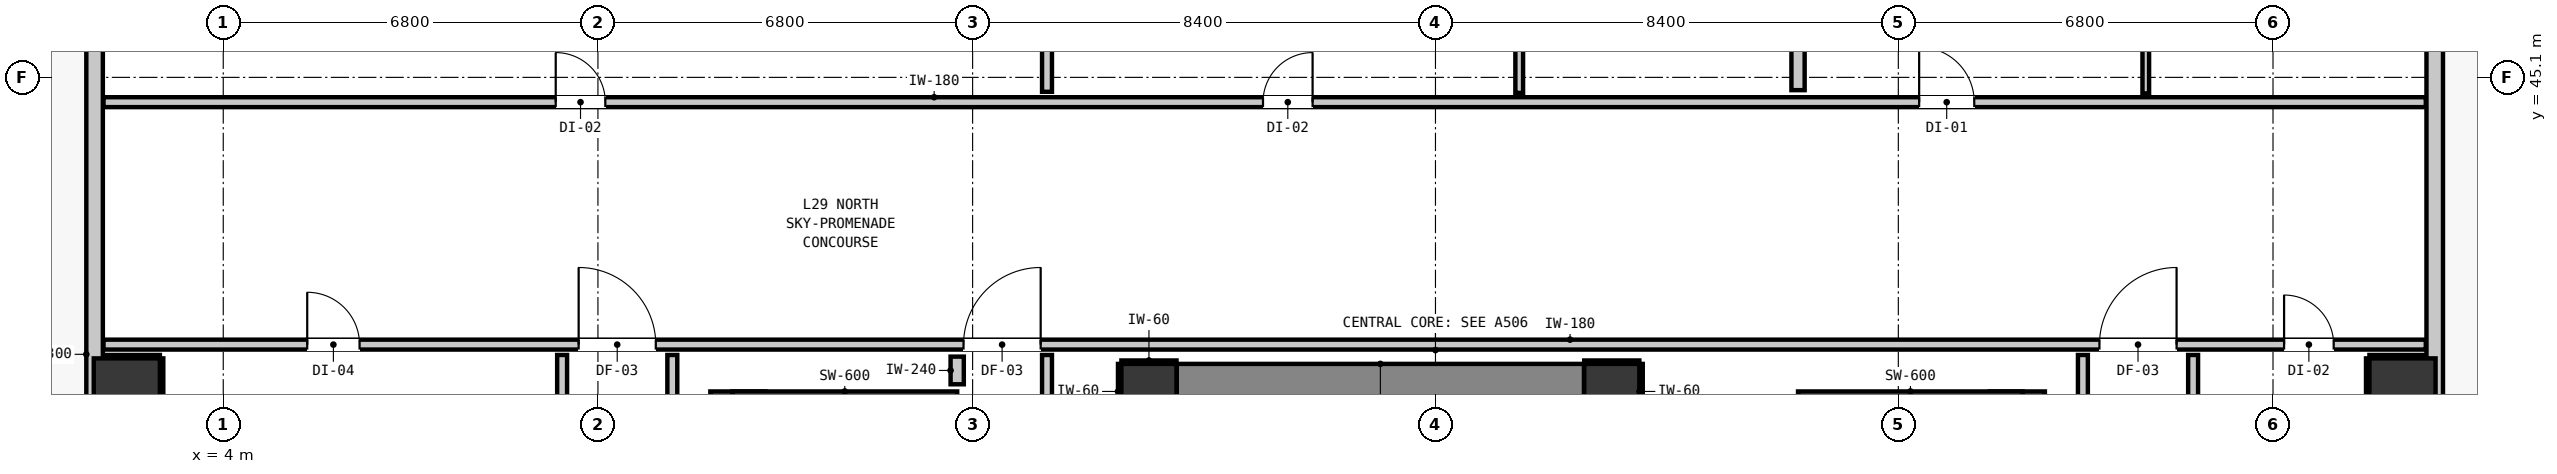
"""IFC4 building model, lengths in metres.
Left out: names, types, materials, properties, quantities, classifications, styles, units other than length and angle.
Written with IfcOpenShell. Run it as: python <this file> out.ifc"""

import sys

from ifc_helpers import new_model, si_unit, direction, frame, frame_2d, origin, origin_2d, place, context, subcontext, project, spatial, rectangle, extrude, element, fill, save


model = new_model("IFC4")
c1 = context("Model", 3, precision=1e-05, world=origin(), true_north=direction((0.0, 1.0)))
c2 = subcontext(c1, "Body", "Model", "MODEL_VIEW")
j1 = project(units=[si_unit("LENGTHUNIT", "METRE"), si_unit("PLANEANGLEUNIT", "RADIAN")], contexts=[c1])
p1 = place(None, origin())
s1 = spatial("IfcSite", under=j1, at=p1, CompositionType="ELEMENT")
p2 = place(p1, origin())
s2 = spatial("IfcBuilding", under=s1, at=p2, CompositionType="ELEMENT")
p3 = place(p2, frame((0.0, 0.0, 102.76)))
s3 = spatial("IfcBuildingStorey", under=s2, at=p3, CompositionType="ELEMENT", Elevation=102.76)
for number, where, z_axis, x_axis in (
    (1, (20.8, 39.4, 0.0), (0.0, 0.0, 1.0), (1.0, 0.0, 0.0)),
    (2, (29.2, 39.4, 0.0), (0.0, 0.0, 1.0), (1.0, 0.0, 0.0)),
):
    element("IfcColumn", number, at=place(p3, frame(where, z_axis=z_axis, x_axis=x_axis)), inside=s3, PredefinedType="COLUMN", context=c2, shape_type="SweptSolid", body=[
        extrude(rectangle(XDim=1.0, YDim=1.0, at=origin_2d()), origin(), (0.0, 0.0, 1.0), 3.32),
    ])
p4 = place(p3, frame((13.34, 31.205, 0.0), z_axis=(0.0, 0.0, 1.0), x_axis=(0.0, 1.0, 0.0)))
e3 = element("IfcWall", 3, at=p4, inside=s3, PredefinedType="SHEAR", context=c2, shape_type="SweptSolid", body=[
    extrude(rectangle(XDim=8.195, YDim=1.0, at=frame_2d((4.097, 0.0))), origin(), (0.0, 0.0, 1.0), 3.32),
])
p5 = place(p3, frame((13.24, 39.1, 0.0), z_axis=(0.0, 0.0, 1.0), x_axis=(1.0, 0.0, 0.0)))
e4 = element("IfcWall", 4, at=p5, inside=s3, PredefinedType="SHEAR", context=c2, shape_type="SweptSolid", body=[
    extrude(rectangle(XDim=4.08, YDim=0.6, at=frame_2d((2.04, 0.0))), origin(), (0.0, 0.0, 1.0), 3.32),
])
p6 = place(p3, frame((36.56, 31.205, 0.0), z_axis=(0.0, 0.0, 1.0), x_axis=(0.0, 1.0, 0.0)))
e5 = element("IfcWall", 5, at=p6, inside=s3, PredefinedType="SHEAR", context=c2, shape_type="SweptSolid", body=[
    extrude(rectangle(XDim=8.195, YDim=1.0, at=frame_2d((4.097, 0.0))), origin(), (0.0, 0.0, 1.0), 3.32),
])
p7 = place(p3, frame((32.58, 39.1, 0.0), z_axis=(0.0, 0.0, 1.0), x_axis=(1.0, 0.0, 0.0)))
e6 = element("IfcWall", 6, at=p7, inside=s3, PredefinedType="SHEAR", context=c2, shape_type="SweptSolid", body=[
    extrude(rectangle(XDim=4.08, YDim=0.6, at=frame_2d((2.04, 0.0))), origin(), (0.0, 0.0, 1.0), 3.32),
])
p8 = place(p3, frame((21.305, 39.4, 0.0), z_axis=(0.0, 0.0, 1.0), x_axis=(1.0, 0.0, 0.0)))
e7 = element("IfcWall", 7, at=p8, inside=s3, PredefinedType="SHEAR", context=c2, shape_type="SweptSolid", body=[
    extrude(rectangle(XDim=7.39, YDim=1.0, at=frame_2d((3.695, 0.0))), origin(), (0.0, 0.0, 1.0), 3.32),
])
for number, where, z_axis, x_axis in (
    (8, (2.25, 39.4, 0.0), (0.0, 0.0, 1.0), (1.0, 0.0, 0.0)),
    (9, (43.55, 39.4, 0.0), (0.0, 0.0, 1.0), (1.0, 0.0, 0.0)),
):
    element("IfcColumn", number, at=place(p3, frame(where, z_axis=z_axis, x_axis=x_axis)), inside=s3, PredefinedType="COLUMN", context=c2, shape_type="SweptSolid", body=[
        extrude(rectangle(XDim=1.2, YDim=1.2, at=origin_2d()), origin(), (0.0, 0.0, 1.0), 2.9),
    ])
p9 = place(p3, frame((1.665, 16.365, 0.0), z_axis=(0.0, 0.0, 1.0), x_axis=(0.0, 1.0, 0.0)))
e10 = element("IfcWall", 10, at=p9, inside=s3, PredefinedType="STANDARD", context=c2, shape_type="SweptSolid", body=[
    extrude(rectangle(XDim=34.67, YDim=0.3, at=frame_2d((17.335, 0.0))), origin(), (0.0, 0.0, 1.0), 2.9),
])
p10 = place(p9, frame((8.955, 0.0, 0.0)))
e11 = element("IfcOpeningElement", 11, at=p10, cuts=e10, PredefinedType="OPENING", context=c2, shape_type="SweptSolid", body=[
    extrude(rectangle(XDim=1.0, YDim=2.15, at=frame_2d((0.5, 1.075))), frame((0.0, 0.16, 0.0), z_axis=(0.0, -1.0, 0.0), x_axis=(1.0, 0.0, 0.0)), (0.0, 0.0, 1.0), 0.32),
])
p11 = place(p9, frame((30.958, 0.0, 0.85)))
e12 = element("IfcOpeningElement", 12, at=p11, cuts=e10, PredefinedType="OPENING", context=c2, shape_type="SweptSolid", body=[
    extrude(rectangle(XDim=1.05, YDim=1.65, at=frame_2d((0.525, 0.825))), frame((0.0, 0.16, 0.0), z_axis=(0.0, -1.0, 0.0), x_axis=(1.0, 0.0, 0.0)), (0.0, 0.0, 1.0), 0.32),
])
p12 = place(p9, frame((10.88, 0.0, 0.85)))
e13 = element("IfcOpeningElement", 13, at=p12, cuts=e10, PredefinedType="OPENING", context=c2, shape_type="SweptSolid", body=[
    extrude(rectangle(XDim=1.05, YDim=1.65, at=frame_2d((0.525, 0.825))), frame((0.0, 0.16, 0.0), z_axis=(0.0, -1.0, 0.0), x_axis=(1.0, 0.0, 0.0)), (0.0, 0.0, 1.0), 0.32),
])
p13 = place(p9, frame((15.41, 0.0, 0.85)))
e14 = element("IfcOpeningElement", 14, at=p13, cuts=e10, PredefinedType="OPENING", context=c2, shape_type="SweptSolid", body=[
    extrude(rectangle(XDim=1.05, YDim=1.65, at=frame_2d((0.525, 0.825))), frame((0.0, 0.16, 0.0), z_axis=(0.0, -1.0, 0.0), x_axis=(1.0, 0.0, 0.0)), (0.0, 0.0, 1.0), 0.32),
])
p14 = place(p3, frame((44.135, 51.035, 0.0), z_axis=(0.0, 0.0, 1.0), x_axis=(0.0, -1.0, 0.0)))
e15 = element("IfcWall", 15, at=p14, inside=s3, PredefinedType="STANDARD", context=c2, shape_type="SweptSolid", body=[
    extrude(rectangle(XDim=34.67, YDim=0.3, at=frame_2d((17.335, 0.0))), origin(), (0.0, 0.0, 1.0), 2.9),
])
p15 = place(p14, frame((0.901, 0.0, 0.0)))
e16 = element("IfcOpeningElement", 16, at=p15, cuts=e15, PredefinedType="OPENING", context=c2, shape_type="SweptSolid", body=[
    extrude(rectangle(XDim=1.0, YDim=2.15, at=frame_2d((0.5, 1.075))), frame((0.0, 0.16, 0.0), z_axis=(0.0, -1.0, 0.0), x_axis=(1.0, 0.0, 0.0)), (0.0, 0.0, 1.0), 0.32),
])
p16 = place(p14, frame((32.608, 0.0, 0.85)))
e17 = element("IfcOpeningElement", 17, at=p16, cuts=e15, PredefinedType="OPENING", context=c2, shape_type="SweptSolid", body=[
    extrude(rectangle(XDim=1.05, YDim=1.65, at=frame_2d((0.525, 0.825))), frame((0.0, 0.16, 0.0), z_axis=(0.0, -1.0, 0.0), x_axis=(1.0, 0.0, 0.0)), (0.0, 0.0, 1.0), 0.32),
])
p17 = place(p14, frame((23.248, 0.0, 0.85)))
e18 = element("IfcOpeningElement", 18, at=p17, cuts=e15, PredefinedType="OPENING", context=c2, shape_type="SweptSolid", body=[
    extrude(rectangle(XDim=1.05, YDim=1.65, at=frame_2d((0.525, 0.825))), frame((0.0, 0.16, 0.0), z_axis=(0.0, -1.0, 0.0), x_axis=(1.0, 0.0, 0.0)), (0.0, 0.0, 1.0), 0.32),
])
p18 = place(p3, frame((1.827, 40.25, 0.0), z_axis=(0.0, 0.0, 1.0), x_axis=(1.0, 0.0, 0.0)))
e19 = element("IfcWall", 19, at=p18, inside=s3, PredefinedType="PARTITIONING", context=c2, shape_type="SweptSolid", body=[
    extrude(rectangle(XDim=42.146, YDim=0.18, at=frame_2d((21.073, 0.0))), origin(), (0.0, 0.0, 1.0), 2.9),
])
p19 = place(p18, frame((15.608, 0.0, 0.0)))
e20 = element("IfcOpeningElement", 20, at=p19, cuts=e19, PredefinedType="OPENING", context=c2, shape_type="SweptSolid", body=[
    extrude(rectangle(XDim=1.4, YDim=2.15, at=frame_2d((0.7, 1.075))), frame((0.0, 0.1, 0.0), z_axis=(0.0, -1.0, 0.0), x_axis=(1.0, 0.0, 0.0)), (0.0, 0.0, 1.0), 0.2),
])
p20 = place(p18, frame((8.623, 0.0, 0.0)))
e21 = element("IfcOpeningElement", 21, at=p20, cuts=e19, PredefinedType="OPENING", context=c2, shape_type="SweptSolid", body=[
    extrude(rectangle(XDim=1.4, YDim=2.15, at=frame_2d((0.7, 1.075))), frame((0.0, 0.1, 0.0), z_axis=(0.0, -1.0, 0.0), x_axis=(1.0, 0.0, 0.0)), (0.0, 0.0, 1.0), 0.2),
])
p21 = place(p18, frame((36.223, 0.0, 0.0)))
e22 = element("IfcOpeningElement", 22, at=p21, cuts=e19, PredefinedType="OPENING", context=c2, shape_type="SweptSolid", body=[
    extrude(rectangle(XDim=1.4, YDim=2.15, at=frame_2d((0.7, 1.075))), frame((0.0, 0.1, 0.0), z_axis=(0.0, -1.0, 0.0), x_axis=(1.0, 0.0, 0.0)), (0.0, 0.0, 1.0), 0.2),
])
p22 = place(p18, frame((3.697, 0.0, 0.0)))
e23 = element("IfcOpeningElement", 23, at=p22, cuts=e19, PredefinedType="OPENING", context=c2, shape_type="SweptSolid", body=[
    extrude(rectangle(XDim=0.95, YDim=2.1, at=frame_2d((0.475, 1.05))), frame((0.0, 0.1, 0.0), z_axis=(0.0, -1.0, 0.0), x_axis=(1.0, 0.0, 0.0)), (0.0, 0.0, 1.0), 0.2),
])
p23 = place(p18, frame((39.574, 0.0, 0.0)))
e24 = element("IfcOpeningElement", 24, at=p23, cuts=e19, PredefinedType="OPENING", context=c2, shape_type="SweptSolid", body=[
    extrude(rectangle(XDim=0.9, YDim=2.1, at=frame_2d((0.45, 1.05))), frame((0.0, 0.1, 0.0), z_axis=(0.0, -1.0, 0.0), x_axis=(1.0, 0.0, 0.0)), (0.0, 0.0, 1.0), 0.2),
])
p24 = place(p3, frame((1.827, 44.65, 0.0), z_axis=(0.0, 0.0, 1.0), x_axis=(1.0, 0.0, 0.0)))
e25 = element("IfcWall", 25, at=p24, inside=s3, PredefinedType="PARTITIONING", context=c2, shape_type="SweptSolid", body=[
    extrude(rectangle(XDim=42.146, YDim=0.18, at=frame_2d((21.073, 0.0))), origin(), (0.0, 0.0, 1.0), 2.9),
])
p25 = place(p24, frame((8.207, 0.0, 0.0)))
e26 = element("IfcOpeningElement", 26, at=p25, cuts=e25, PredefinedType="OPENING", context=c2, shape_type="SweptSolid", body=[
    extrude(rectangle(XDim=0.9, YDim=2.1, at=frame_2d((0.45, 1.05))), frame((0.0, 0.1, 0.0), z_axis=(0.0, -1.0, 0.0), x_axis=(1.0, 0.0, 0.0)), (0.0, 0.0, 1.0), 0.2),
])
p26 = place(p24, frame((21.043, 0.0, 0.0)))
e27 = element("IfcOpeningElement", 27, at=p26, cuts=e25, PredefinedType="OPENING", context=c2, shape_type="SweptSolid", body=[
    extrude(rectangle(XDim=0.9, YDim=2.1, at=frame_2d((0.45, 1.05))), frame((0.0, 0.1, 0.0), z_axis=(0.0, -1.0, 0.0), x_axis=(1.0, 0.0, 0.0)), (0.0, 0.0, 1.0), 0.2),
])
p27 = place(p24, frame((32.951, 0.0, 0.0)))
e28 = element("IfcOpeningElement", 28, at=p27, cuts=e25, PredefinedType="OPENING", context=c2, shape_type="SweptSolid", body=[
    extrude(rectangle(XDim=1.0, YDim=2.15, at=frame_2d((0.5, 1.075))), frame((0.0, 0.1, 0.0), z_axis=(0.0, -1.0, 0.0), x_axis=(1.0, 0.0, 0.0)), (0.0, 0.0, 1.0), 0.2),
])
p28 = place(p3, frame((17.32, 39.53, 0.0), z_axis=(0.0, 0.0, 1.0), x_axis=(0.0, 1.0, 0.0)))
e29 = element("IfcWall", 29, at=p28, inside=s3, PredefinedType="PARTITIONING", context=c2, shape_type="SweptSolid", body=[
    extrude(rectangle(XDim=0.502, YDim=0.24, at=frame_2d((0.251, 0.0))), origin(), (0.0, 0.0, 1.0), 2.9),
])
p29 = place(p3, frame((32.58, 44.868, 0.0), z_axis=(0.0, 0.0, 1.0), x_axis=(0.0, 1.0, 0.0)))
e30 = element("IfcWall", 30, at=p29, inside=s3, PredefinedType="PARTITIONING", context=c2, shape_type="SweptSolid", body=[
    extrude(rectangle(XDim=3.421, YDim=0.24, at=frame_2d((1.71, 0.0))), origin(), (0.0, 0.0, 1.0), 2.9),
])
p30 = place(p29, frame((1.246, 0.0, 0.0)))
e31 = element("IfcOpeningElement", 31, at=p30, cuts=e30, PredefinedType="OPENING", context=c2, shape_type="SweptSolid", body=[
    extrude(rectangle(XDim=0.86, YDim=2.02, at=frame_2d((0.43, 1.01))), frame((0.0, 0.13, 0.0), z_axis=(0.0, -1.0, 0.0), x_axis=(1.0, 0.0, 0.0)), (0.0, 0.0, 1.0), 0.26),
])
p31 = place(p3, frame((10.15, 36.818, 0.0), z_axis=(0.0, 0.0, 1.0), x_axis=(0.0, 1.0, 0.0)))
e32 = element("IfcWall", 32, at=p31, inside=s3, PredefinedType="PARTITIONING", context=c2, shape_type="SweptSolid", body=[
    extrude(rectangle(XDim=3.244, YDim=0.18, at=frame_2d((1.622, 0.0))), origin(), (0.0, 0.0, 1.0), 2.9),
])
p32 = place(p3, frame((12.15, 21.368, 0.0), z_axis=(0.0, 0.0, 1.0), x_axis=(0.0, 1.0, 0.0)))
e33 = element("IfcWall", 33, at=p32, inside=s3, PredefinedType="PARTITIONING", context=c2, shape_type="SweptSolid", body=[
    extrude(rectangle(XDim=18.694, YDim=0.18, at=frame_2d((9.347, 0.0))), origin(), (0.0, 0.0, 1.0), 2.9),
])
p33 = place(p3, frame((18.95, 39.058, 0.0), z_axis=(0.0, 0.0, 1.0), x_axis=(0.0, 1.0, 0.0)))
e34 = element("IfcWall", 34, at=p33, inside=s3, PredefinedType="PARTITIONING", context=c2, shape_type="SweptSolid", body=[
    extrude(rectangle(XDim=1.004, YDim=0.18, at=frame_2d((0.502, 0.0))), origin(), (0.0, 0.0, 1.0), 2.9),
])
p34 = place(p3, frame((18.95, 44.838, 0.0), z_axis=(0.0, 0.0, 1.0), x_axis=(0.0, 1.0, 0.0)))
e35 = element("IfcWall", 35, at=p34, inside=s3, PredefinedType="PARTITIONING", context=c2, shape_type="SweptSolid", body=[
    extrude(rectangle(XDim=8.535, YDim=0.18, at=frame_2d((4.268, 0.0))), origin(), (0.0, 0.0, 1.0), 2.9),
])
p35 = place(p3, frame((37.75, 21.368, 0.0), z_axis=(0.0, 0.0, 1.0), x_axis=(0.0, 1.0, 0.0)))
e36 = element("IfcWall", 36, at=p35, inside=s3, PredefinedType="PARTITIONING", context=c2, shape_type="SweptSolid", body=[
    extrude(rectangle(XDim=18.694, YDim=0.18, at=frame_2d((9.347, 0.0))), origin(), (0.0, 0.0, 1.0), 2.9),
])
p36 = place(p3, frame((39.75, 34.158, 0.0), z_axis=(0.0, 0.0, 1.0), x_axis=(0.0, 1.0, 0.0)))
e37 = element("IfcWall", 37, at=p36, inside=s3, PredefinedType="PARTITIONING", context=c2, shape_type="SweptSolid", body=[
    extrude(rectangle(XDim=5.904, YDim=0.18, at=frame_2d((2.952, 0.0))), origin(), (0.0, 0.0, 1.0), 2.9),
])
p37 = place(p3, frame((27.52, 44.818, 0.0), z_axis=(0.0, 0.0, 1.0), x_axis=(0.0, 1.0, 0.0)))
e38 = element("IfcWall", 38, at=p37, inside=s3, PredefinedType="PARTITIONING", context=c2, shape_type="SweptSolid", body=[
    extrude(rectangle(XDim=3.447, YDim=0.14, at=frame_2d((1.723, 0.0))), origin(), (0.0, 0.0, 1.0), 2.9),
])
p38 = place(p3, frame((38.891, 44.808, 0.0), z_axis=(0.0, 0.0, 1.0), x_axis=(0.0, 1.0, 0.0)))
e39 = element("IfcWall", 39, at=p38, inside=s3, PredefinedType="PARTITIONING", context=c2, shape_type="SweptSolid", body=[
    extrude(rectangle(XDim=3.467, YDim=0.12, at=frame_2d((1.733, 0.0))), origin(), (0.0, 0.0, 1.0), 2.9),
])
p39 = place(p38, frame((1.286, 0.0, 0.0)))
e40 = element("IfcOpeningElement", 40, at=p39, cuts=e39, PredefinedType="OPENING", context=c2, shape_type="SweptSolid", body=[
    extrude(rectangle(XDim=0.9, YDim=2.1, at=frame_2d((0.45, 1.05))), frame((0.0, 0.07, 0.0), z_axis=(0.0, -1.0, 0.0), x_axis=(1.0, 0.0, 0.0)), (0.0, 0.0, 1.0), 0.14),
])
for number, where, z_axis, x_axis in (
    (41, (20.3, 39.932, 0.0), (0.0, 0.0, 1.0), (1.0, 0.0, 0.0)),
    (42, (20.268, 38.9, 0.0), (0.0, 0.0, 1.0), (0.0, 1.0, 0.0)),
    (43, (28.7, 39.932, 0.0), (0.0, 0.0, 1.0), (1.0, 0.0, 0.0)),
    (44, (29.732, 38.9, 0.0), (0.0, 0.0, 1.0), (0.0, 1.0, 0.0)),
):
    element("IfcWall", number, at=place(p3, frame(where, z_axis=z_axis, x_axis=x_axis)), inside=s3, PredefinedType="PARTITIONING", context=c2, shape_type="SweptSolid", body=[
        extrude(rectangle(XDim=1.0, YDim=0.06, at=frame_2d((0.5, 0.0))), origin(), (0.0, 0.0, 1.0), 0.905),
    ])
p40 = place(p3, frame((1.83, 40.032, 0.0), z_axis=(0.0, 0.0, 1.0), x_axis=(1.0, 0.0, 0.0)))
e45 = element("IfcWall", 45, at=p40, inside=s3, PredefinedType="PARTITIONING", context=c2, shape_type="SweptSolid", body=[
    extrude(rectangle(XDim=1.02, YDim=0.06, at=frame_2d((0.51, 0.0))), origin(), (0.0, 0.0, 1.0), 0.905),
])
p41 = place(p3, frame((2.882, 38.8, 0.0), z_axis=(0.0, 0.0, 1.0), x_axis=(0.0, 1.0, 0.0)))
e46 = element("IfcWall", 46, at=p41, inside=s3, PredefinedType="PARTITIONING", context=c2, shape_type="SweptSolid", body=[
    extrude(rectangle(XDim=1.2, YDim=0.06, at=frame_2d((0.6, 0.0))), origin(), (0.0, 0.0, 1.0), 1.45),
])
p42 = place(p3, frame((42.95, 40.032, 0.0), z_axis=(0.0, 0.0, 1.0), x_axis=(1.0, 0.0, 0.0)))
e47 = element("IfcWall", 47, at=p42, inside=s3, PredefinedType="PARTITIONING", context=c2, shape_type="SweptSolid", body=[
    extrude(rectangle(XDim=1.02, YDim=0.06, at=frame_2d((0.51, 0.0))), origin(), (0.0, 0.0, 1.0), 0.905),
])
p43 = place(p3, frame((42.918, 38.8, 0.0), z_axis=(0.0, 0.0, 1.0), x_axis=(0.0, 1.0, 0.0)))
e48 = element("IfcWall", 48, at=p43, inside=s3, PredefinedType="PARTITIONING", context=c2, shape_type="SweptSolid", body=[
    extrude(rectangle(XDim=1.2, YDim=0.06, at=frame_2d((0.6, 0.0))), origin(), (0.0, 0.0, 1.0), 1.45),
])
p44 = place(p19, origin())
e49 = element("IfcDoor", 49, at=p44, inside=s3, OperationType="SINGLE_SWING_RIGHT", PredefinedType="DOOR", context=c2, shape_type="SweptSolid", body=[
    extrude(rectangle(XDim=1.4, YDim=2.15, at=frame_2d((0.7, 1.075))), frame((0.0, 0.025, 0.0), z_axis=(0.0, -1.0, 0.0), x_axis=(1.0, 0.0, 0.0)), (0.0, 0.0, 1.0), 0.05),
])
fill(e20, e49)
p45 = place(p20, origin())
e50 = element("IfcDoor", 50, at=p45, inside=s3, OperationType="SINGLE_SWING_LEFT", PredefinedType="DOOR", context=c2, shape_type="SweptSolid", body=[
    extrude(rectangle(XDim=1.4, YDim=2.15, at=frame_2d((0.7, 1.075))), frame((0.0, 0.025, 0.0), z_axis=(0.0, -1.0, 0.0), x_axis=(1.0, 0.0, 0.0)), (0.0, 0.0, 1.0), 0.05),
])
fill(e21, e50)
p46 = place(p21, origin())
e51 = element("IfcDoor", 51, at=p46, inside=s3, OperationType="SINGLE_SWING_RIGHT", PredefinedType="DOOR", context=c2, shape_type="SweptSolid", body=[
    extrude(rectangle(XDim=1.4, YDim=2.15, at=frame_2d((0.7, 1.075))), frame((0.0, 0.025, 0.0), z_axis=(0.0, -1.0, 0.0), x_axis=(1.0, 0.0, 0.0)), (0.0, 0.0, 1.0), 0.05),
])
fill(e22, e51)
p47 = place(p25, origin())
e52 = element("IfcDoor", 52, at=p47, inside=s3, OperationType="SINGLE_SWING_LEFT", PredefinedType="DOOR", context=c2, shape_type="SweptSolid", body=[
    extrude(rectangle(XDim=0.9, YDim=2.1, at=frame_2d((0.45, 1.05))), frame((0.0, 0.025, 0.0), z_axis=(0.0, -1.0, 0.0), x_axis=(1.0, 0.0, 0.0)), (0.0, 0.0, 1.0), 0.05),
])
fill(e26, e52)
p48 = place(p26, origin())
e53 = element("IfcDoor", 53, at=p48, inside=s3, OperationType="SINGLE_SWING_RIGHT", PredefinedType="DOOR", context=c2, shape_type="SweptSolid", body=[
    extrude(rectangle(XDim=0.9, YDim=2.1, at=frame_2d((0.45, 1.05))), frame((0.0, 0.025, 0.0), z_axis=(0.0, -1.0, 0.0), x_axis=(1.0, 0.0, 0.0)), (0.0, 0.0, 1.0), 0.05),
])
fill(e27, e53)
p49 = place(p27, origin())
e54 = element("IfcDoor", 54, at=p49, inside=s3, OperationType="SINGLE_SWING_LEFT", PredefinedType="DOOR", context=c2, shape_type="SweptSolid", body=[
    extrude(rectangle(XDim=1.0, YDim=2.15, at=frame_2d((0.5, 1.075))), frame((0.0, 0.025, 0.0), z_axis=(0.0, -1.0, 0.0), x_axis=(1.0, 0.0, 0.0)), (0.0, 0.0, 1.0), 0.05),
])
fill(e28, e54)
p50 = place(p22, origin())
e55 = element("IfcDoor", 55, at=p50, inside=s3, OperationType="SINGLE_SWING_LEFT", PredefinedType="DOOR", context=c2, shape_type="SweptSolid", body=[
    extrude(rectangle(XDim=0.95, YDim=2.1, at=frame_2d((0.475, 1.05))), frame((0.0, 0.025, 0.0), z_axis=(0.0, -1.0, 0.0), x_axis=(1.0, 0.0, 0.0)), (0.0, 0.0, 1.0), 0.05),
])
fill(e23, e55)
p51 = place(p23, origin())
e56 = element("IfcDoor", 56, at=p51, inside=s3, OperationType="SINGLE_SWING_LEFT", PredefinedType="DOOR", context=c2, shape_type="SweptSolid", body=[
    extrude(rectangle(XDim=0.9, YDim=2.1, at=frame_2d((0.45, 1.05))), frame((0.0, 0.025, 0.0), z_axis=(0.0, -1.0, 0.0), x_axis=(1.0, 0.0, 0.0)), (0.0, 0.0, 1.0), 0.05),
])
fill(e24, e56)
save(model, sys.argv[1])
